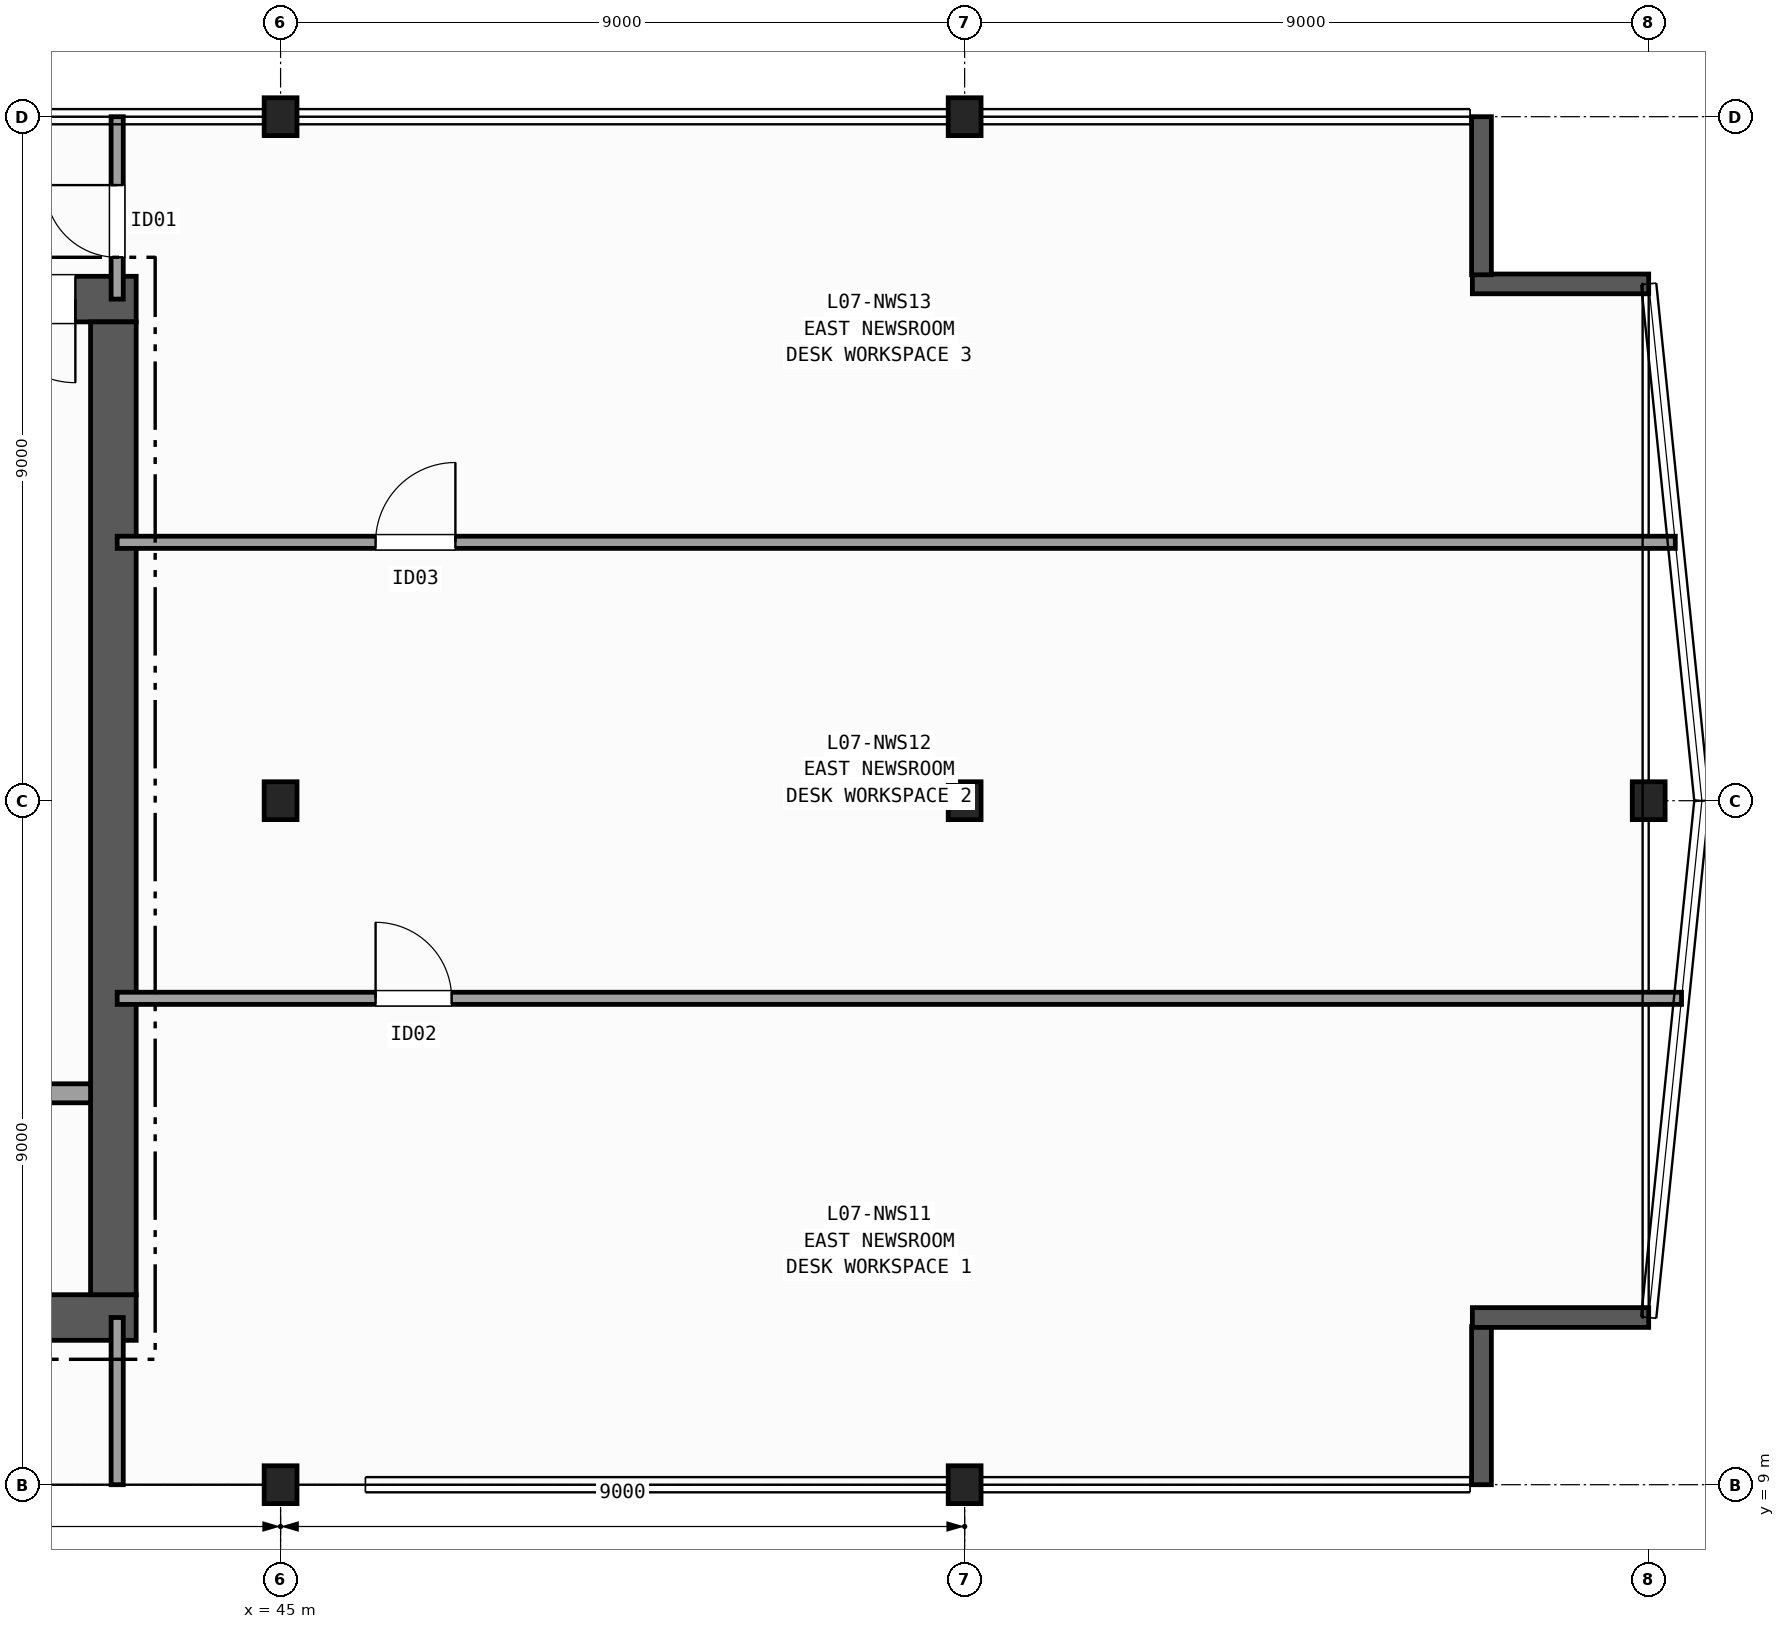
"""IFC4 building model, lengths in metres.
Left out: names, types, materials, properties, quantities, classifications, styles, units other than length and angle.
Written with IfcOpenShell. Run it as: python <this file> out.ifc"""

import sys

from ifc_helpers import new_model, si_unit, direction, frame, frame_2d, origin, origin_2d, place, context, subcontext, project, spatial, rectangle, i_section, extrude, element, fill, save


model = new_model("IFC4")
c1 = context("Model", 3, precision=1e-05, world=origin(), true_north=direction((0.0, 1.0)))
c2 = subcontext(c1, "Body", "Model", "MODEL_VIEW")
j1 = project(units=[si_unit("LENGTHUNIT", "METRE"), si_unit("PLANEANGLEUNIT", "RADIAN")], contexts=[c1])
p1 = place(None, origin())
s1 = spatial("IfcSite", under=j1, at=p1, CompositionType="ELEMENT")
p2 = place(p1, origin())
s2 = spatial("IfcBuilding", under=s1, at=p2, CompositionType="ELEMENT")
p3 = place(p2, frame((0.0, 0.0, 36.0)))
s3 = spatial("IfcBuildingStorey", under=s2, at=p3, CompositionType="ELEMENT", Elevation=36.0)
for number, where, z_axis, x_axis in (
    (1, (45.0, 9.0, 0.0), (0.0, 0.0, 1.0), (1.0, 0.0, 0.0)),
    (2, (45.0, 18.0, 0.0), (0.0, 0.0, 1.0), (1.0, 0.0, 0.0)),
    (3, (45.0, 27.0, 0.0), (0.0, 0.0, 1.0), (1.0, 0.0, 0.0)),
    (4, (54.0, 9.0, 0.0), (0.0, 0.0, 1.0), (1.0, 0.0, 0.0)),
    (5, (54.0, 18.0, 0.0), (0.0, 0.0, 1.0), (1.0, 0.0, 0.0)),
    (6, (54.0, 27.0, 0.0), (0.0, 0.0, 1.0), (1.0, 0.0, 0.0)),
    (7, (63.0, 18.0, 0.0), (0.0, 0.0, 1.0), (1.0, 0.0, 0.0)),
):
    element("IfcColumn", number, at=place(p3, frame(where, z_axis=z_axis, x_axis=x_axis)), inside=s3, PredefinedType="COLUMN", context=c2, shape_type="SweptSolid", body=[
        extrude(i_section(OverallWidth=0.432, OverallDepth=0.498, WebThickness=0.056, FlangeThickness=0.089, FilletRadius=0.015, at=origin_2d()), origin(), (0.0, 0.0, 1.0), 3.7),
    ])
p4 = place(p3, frame((60.8, 9.0, 0.0), z_axis=(0.0, 0.0, 1.0), x_axis=(0.0, 1.0, 0.0)))
e8 = element("IfcWall", 8, at=p4, inside=s3, PredefinedType="SOLIDWALL", context=c2, shape_type="SweptSolid", body=[
    extrude(rectangle(XDim=2.08, YDim=0.26, at=frame_2d((1.04, 0.0))), origin(), (0.0, 0.0, 1.0), 3.42),
])
for number, where, z_axis, x_axis in (
    (9, (60.68, 11.2, 0.0), (0.0, 0.0, 1.0), (1.0, 0.0, 0.0)),
    (10, (63.0, 24.8, 0.0), (0.0, 0.0, 1.0), (-1.0, 0.0, 0.0)),
):
    element("IfcWall", number, at=place(p3, frame(where, z_axis=z_axis, x_axis=x_axis)), inside=s3, PredefinedType="SOLIDWALL", context=c2, shape_type="SweptSolid", body=[
        extrude(rectangle(XDim=2.32, YDim=0.26, at=frame_2d((1.16, 0.0))), origin(), (0.0, 0.0, 1.0), 3.42),
    ])
p5 = place(p3, frame((60.8, 24.92, 0.0), z_axis=(0.0, 0.0, 1.0), x_axis=(0.0, 1.0, 0.0)))
e11 = element("IfcWall", 11, at=p5, inside=s3, PredefinedType="SOLIDWALL", context=c2, shape_type="SweptSolid", body=[
    extrude(rectangle(XDim=2.08, YDim=0.26, at=frame_2d((1.04, 0.0))), origin(), (0.0, 0.0, 1.0), 3.42),
])
p6 = place(p3, frame((29.1, 11.2, 0.0), z_axis=(0.0, 0.0, 1.0), x_axis=(1.0, 0.0, 0.0)))
e12 = element("IfcWall", 12, at=p6, inside=s3, PredefinedType="SHEAR", context=c2, shape_type="SweptSolid", body=[
    extrude(rectangle(XDim=14.0, YDim=0.6, at=frame_2d((7.0, 0.0))), origin(), (0.0, 0.0, 1.0), 3.42),
])
p7 = place(p3, frame((43.1, 24.6, 0.0), z_axis=(0.0, 0.0, 1.0), x_axis=(-1.0, 0.0, 0.0)))
e13 = element("IfcWall", 13, at=p7, inside=s3, PredefinedType="SHEAR", context=c2, shape_type="SweptSolid", body=[
    extrude(rectangle(XDim=14.0, YDim=0.6, at=frame_2d((7.0, 0.0))), origin(), (0.0, 0.0, 1.0), 3.42),
])
p8 = place(p7, frame((0.8, 0.0, 0.0)))
e14 = element("IfcOpeningElement", 14, at=p8, cuts=e13, PredefinedType="OPENING", context=c2, shape_type="SweptSolid", body=[
    extrude(rectangle(XDim=1.1, YDim=2.15, at=frame_2d((0.55, 1.075))), frame((0.0, 0.31, 0.0), z_axis=(0.0, -1.0, 0.0), x_axis=(1.0, 0.0, 0.0)), (0.0, 0.0, 1.0), 0.62),
])
p9 = place(p7, frame((2.75, 0.0, 0.0)))
e15 = element("IfcOpeningElement", 15, at=p9, cuts=e13, PredefinedType="OPENING", context=c2, shape_type="SweptSolid", body=[
    extrude(rectangle(XDim=0.9, YDim=2.1, at=frame_2d((0.45, 1.05))), frame((0.0, 0.31, 0.0), z_axis=(0.0, -1.0, 0.0), x_axis=(1.0, 0.0, 0.0)), (0.0, 0.0, 1.0), 0.62),
])
p10 = place(p7, frame((4.65, 0.0, 0.0)))
e16 = element("IfcOpeningElement", 16, at=p10, cuts=e13, PredefinedType="OPENING", context=c2, shape_type="SweptSolid", body=[
    extrude(rectangle(XDim=0.9, YDim=2.1, at=frame_2d((0.45, 1.05))), frame((0.0, 0.31, 0.0), z_axis=(0.0, -1.0, 0.0), x_axis=(1.0, 0.0, 0.0)), (0.0, 0.0, 1.0), 0.62),
])
p11 = place(p3, frame((42.8, 11.5, 0.0), z_axis=(0.0, 0.0, 1.0), x_axis=(0.0, 1.0, 0.0)))
e17 = element("IfcWall", 17, at=p11, inside=s3, PredefinedType="SHEAR", context=c2, shape_type="SweptSolid", body=[
    extrude(rectangle(XDim=12.8, YDim=0.6, at=frame_2d((6.4, 0.0))), origin(), (0.0, 0.0, 1.0), 3.42),
])
p12 = place(p3, frame((33.07, 14.15, 0.0), z_axis=(0.0, 0.0, 1.0), x_axis=(1.0, 0.0, 0.0)))
e18 = element("IfcWall", 18, at=p12, inside=s3, PredefinedType="PARTITIONING", context=c2, shape_type="SweptSolid", body=[
    extrude(rectangle(XDim=9.43, YDim=0.25, at=frame_2d((4.715, 0.0))), origin(), (0.0, 0.0, 1.0), 3.42),
])
p13 = place(p12, frame((0.755, 0.0, 0.0)))
e19 = element("IfcOpeningElement", 19, at=p13, cuts=e18, PredefinedType="OPENING", context=c2, shape_type="SweptSolid", body=[
    extrude(rectangle(XDim=1.15, YDim=2.15, at=frame_2d((0.575, 1.075))), frame((0.0, 0.135, 0.0), z_axis=(0.0, -1.0, 0.0), x_axis=(1.0, 0.0, 0.0)), (0.0, 0.0, 1.0), 0.27),
])
p14 = place(p12, frame((3.355, 0.0, 0.0)))
e20 = element("IfcOpeningElement", 20, at=p14, cuts=e18, PredefinedType="OPENING", context=c2, shape_type="SweptSolid", body=[
    extrude(rectangle(XDim=1.15, YDim=2.15, at=frame_2d((0.575, 1.075))), frame((0.0, 0.135, 0.0), z_axis=(0.0, -1.0, 0.0), x_axis=(1.0, 0.0, 0.0)), (0.0, 0.0, 1.0), 0.27),
])
p15 = place(p3, frame((42.85, 9.0, 0.0), z_axis=(0.0, 0.0, 1.0), x_axis=(0.0, 1.0, 0.0)))
e21 = element("IfcWall", 21, at=p15, inside=s3, PredefinedType="PARTITIONING", context=c2, shape_type="SweptSolid", body=[
    extrude(rectangle(XDim=2.2, YDim=0.16, at=frame_2d((1.1, 0.0))), origin(), (0.0, 0.0, 1.0), 2.627),
])
p16 = place(p3, frame((42.85, 24.6, 0.0), z_axis=(0.0, 0.0, 1.0), x_axis=(0.0, 1.0, 0.0)))
e22 = element("IfcWall", 22, at=p16, inside=s3, PredefinedType="PARTITIONING", context=c2, shape_type="SweptSolid", body=[
    extrude(rectangle(XDim=2.4, YDim=0.16, at=frame_2d((1.2, 0.0))), origin(), (0.0, 0.0, 1.0), 2.627),
])
p17 = place(p16, frame((0.55, 0.0, 0.0)))
e23 = element("IfcOpeningElement", 23, at=p17, cuts=e22, PredefinedType="OPENING", context=c2, shape_type="SweptSolid", body=[
    extrude(rectangle(XDim=0.95, YDim=2.1, at=frame_2d((0.475, 1.05))), frame((0.0, 0.09, 0.0), z_axis=(0.0, -1.0, 0.0), x_axis=(1.0, 0.0, 0.0)), (0.0, 0.0, 1.0), 0.18),
])
p18 = place(p3, frame((42.85, 15.4, 0.0), z_axis=(0.0, 0.0, 1.0), x_axis=(1.0, 0.0, 0.0)))
e24 = element("IfcWall", 24, at=p18, inside=s3, PredefinedType="PARTITIONING", context=c2, shape_type="SweptSolid", body=[
    extrude(rectangle(XDim=20.582, YDim=0.16, at=frame_2d((10.291, 0.0))), origin(), (0.0, 0.0, 1.0), 3.42),
])
p19 = place(p18, frame((3.4, 0.0, 0.0)))
e25 = element("IfcOpeningElement", 25, at=p19, cuts=e24, PredefinedType="OPENING", context=c2, shape_type="SweptSolid", body=[
    extrude(rectangle(XDim=1.0, YDim=2.1, at=frame_2d((0.5, 1.05))), frame((0.0, 0.09, 0.0), z_axis=(0.0, -1.0, 0.0), x_axis=(1.0, 0.0, 0.0)), (0.0, 0.0, 1.0), 0.18),
])
p20 = place(p3, frame((42.85, 21.4, 0.0), z_axis=(0.0, 0.0, 1.0), x_axis=(1.0, 0.0, 0.0)))
e26 = element("IfcWall", 26, at=p20, inside=s3, PredefinedType="PARTITIONING", context=c2, shape_type="SweptSolid", body=[
    extrude(rectangle(XDim=20.5, YDim=0.16, at=frame_2d((10.25, 0.0))), origin(), (0.0, 0.0, 1.0), 3.42),
])
p21 = place(p20, frame((3.4, 0.0, 0.0)))
e27 = element("IfcOpeningElement", 27, at=p21, cuts=e26, PredefinedType="OPENING", context=c2, shape_type="SweptSolid", body=[
    extrude(rectangle(XDim=1.05, YDim=2.15, at=frame_2d((0.525, 1.075))), frame((0.0, 0.09, 0.0), z_axis=(0.0, -1.0, 0.0), x_axis=(1.0, 0.0, 0.0)), (0.0, 0.0, 1.0), 0.18),
])
p22 = place(p8, origin())
e28 = element("IfcDoor", 28, at=p22, inside=s3, OperationType="SINGLE_SWING_LEFT", PredefinedType="DOOR", context=c2, shape_type="SweptSolid", body=[
    extrude(rectangle(XDim=1.1, YDim=2.15, at=frame_2d((0.55, 1.075))), frame((0.0, 0.025, 0.0), z_axis=(0.0, -1.0, 0.0), x_axis=(1.0, 0.0, 0.0)), (0.0, 0.0, 1.0), 0.05),
])
fill(e14, e28)
p23 = place(p17, origin())
e29 = element("IfcDoor", 29, at=p23, inside=s3, OperationType="SINGLE_SWING_RIGHT", PredefinedType="DOOR", context=c2, shape_type="SweptSolid", body=[
    extrude(rectangle(XDim=0.95, YDim=2.1, at=frame_2d((0.475, 1.05))), frame((0.0, 0.025, 0.0), z_axis=(0.0, -1.0, 0.0), x_axis=(1.0, 0.0, 0.0)), (0.0, 0.0, 1.0), 0.05),
])
fill(e23, e29)
p24 = place(p19, origin())
e30 = element("IfcDoor", 30, at=p24, inside=s3, OperationType="SINGLE_SWING_LEFT", PredefinedType="DOOR", context=c2, shape_type="SweptSolid", body=[
    extrude(rectangle(XDim=1.0, YDim=2.1, at=frame_2d((0.5, 1.05))), frame((0.0, 0.025, 0.0), z_axis=(0.0, -1.0, 0.0), x_axis=(1.0, 0.0, 0.0)), (0.0, 0.0, 1.0), 0.05),
])
fill(e25, e30)
p25 = place(p21, origin())
e31 = element("IfcDoor", 31, at=p25, inside=s3, OperationType="SINGLE_SWING_RIGHT", PredefinedType="DOOR", context=c2, shape_type="SweptSolid", body=[
    extrude(rectangle(XDim=1.05, YDim=2.15, at=frame_2d((0.525, 1.075))), frame((0.0, 0.025, 0.0), z_axis=(0.0, -1.0, 0.0), x_axis=(1.0, 0.0, 0.0)), (0.0, 0.0, 1.0), 0.05),
])
fill(e27, e31)
save(model, sys.argv[1])
